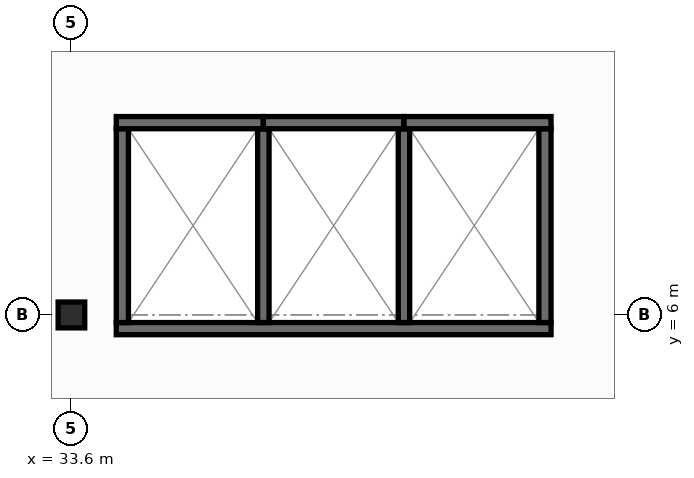
"""IFC4 building model, lengths in metres.
Left out: names, types, materials, properties, quantities, classifications, styles, units other than length and angle.
Written with IfcOpenShell. Run it as: python <this file> out.ifc"""

import sys

from ifc_helpers import new_model, si_unit, direction, frame, frame_2d, origin, origin_2d, place, context, subcontext, project, spatial, rectangle, i_section, extrude, element, save


model = new_model("IFC4")
c1 = context("Model", 3, precision=1e-05, world=origin(), true_north=direction((0.0, 1.0)))
c2 = subcontext(c1, "Body", "Model", "MODEL_VIEW")
j1 = project(units=[si_unit("LENGTHUNIT", "METRE"), si_unit("PLANEANGLEUNIT", "RADIAN")], contexts=[c1])
p1 = place(None, origin())
s1 = spatial("IfcSite", under=j1, at=p1, CompositionType="ELEMENT")
p2 = place(p1, origin())
s2 = spatial("IfcBuilding", under=s1, at=p2, CompositionType="ELEMENT")
p3 = place(p2, frame((0.0, 0.0, 58.05)))
s3 = spatial("IfcBuildingStorey", under=s2, at=p3, CompositionType="ELEMENT", Elevation=58.05)
p4 = place(p3, frame((33.6, 6.0, 0.0), z_axis=(0.0, 0.0, 1.0), x_axis=(1.0, 0.0, 0.0)))
e1 = element("IfcColumn", 1, at=p4, inside=s3, PredefinedType="COLUMN", context=c2, shape_type="SweptSolid", body=[
    extrude(i_section(OverallWidth=0.35, OverallDepth=0.34, WebThickness=0.016, FlangeThickness=0.028, at=origin_2d()), origin(), (0.0, 0.0, 1.0), 3.95),
])
p5 = place(p3, frame((34.19, 5.82, 0.0), z_axis=(0.0, 0.0, 1.0), x_axis=(1.0, 0.0, 0.0)))
e2 = element("IfcWall", 2, at=p5, inside=s3, PredefinedType="SHEAR", context=c2, shape_type="SweptSolid", body=[
    extrude(rectangle(XDim=5.72, YDim=0.16, at=frame_2d((2.86, 0.0))), origin(), (0.0, 0.0, 1.0), 3.71),
])
for number, where, z_axis, x_axis in (
    (3, (34.27, 5.9, 0.0), (0.0, 0.0, 1.0), (0.0, 1.0, 0.0)),
    (4, (39.83, 5.9, 0.0), (0.0, 0.0, 1.0), (0.0, 1.0, 0.0)),
):
    element("IfcWall", number, at=place(p3, frame(where, z_axis=z_axis, x_axis=x_axis)), inside=s3, PredefinedType="SHEAR", context=c2, shape_type="SweptSolid", body=[
        extrude(rectangle(XDim=2.55, YDim=0.16, at=frame_2d((1.275, 0.0))), origin(), (0.0, 0.0, 1.0), 3.71),
    ])
for number, where, z_axis, x_axis in (
    (5, (36.125, 5.9, 0.0), (0.0, 0.0, 1.0), (0.0, 1.0, 0.0)),
    (6, (37.975, 5.9, 0.0), (0.0, 0.0, 1.0), (0.0, 1.0, 0.0)),
):
    element("IfcWall", number, at=place(p3, frame(where, z_axis=z_axis, x_axis=x_axis)), inside=s3, PredefinedType="SHEAR", context=c2, shape_type="SweptSolid", body=[
        extrude(rectangle(XDim=2.55, YDim=0.15, at=frame_2d((1.275, 0.0))), origin(), (0.0, 0.0, 1.0), 3.71),
    ])
p6 = place(p3, frame((34.19, 8.53, 0.0), z_axis=(0.0, 0.0, 1.0), x_axis=(1.0, 0.0, 0.0)))
e7 = element("IfcWall", 7, at=p6, inside=s3, PredefinedType="SHEAR", context=c2, shape_type="SweptSolid", body=[
    extrude(rectangle(XDim=1.935, YDim=0.16, at=frame_2d((0.968, 0.0))), origin(), (0.0, 0.0, 1.0), 3.71),
])
p7 = place(p3, frame((36.125, 8.53, 0.0), z_axis=(0.0, 0.0, 1.0), x_axis=(1.0, 0.0, 0.0)))
e8 = element("IfcWall", 8, at=p7, inside=s3, PredefinedType="SHEAR", context=c2, shape_type="SweptSolid", body=[
    extrude(rectangle(XDim=1.85, YDim=0.16, at=frame_2d((0.925, 0.0))), origin(), (0.0, 0.0, 1.0), 3.71),
])
p8 = place(p3, frame((37.975, 8.53, 0.0), z_axis=(0.0, 0.0, 1.0), x_axis=(1.0, 0.0, 0.0)))
e9 = element("IfcWall", 9, at=p8, inside=s3, PredefinedType="SHEAR", context=c2, shape_type="SweptSolid", body=[
    extrude(rectangle(XDim=1.935, YDim=0.16, at=frame_2d((0.967, 0.0))), origin(), (0.0, 0.0, 1.0), 3.71),
])
save(model, sys.argv[1])
